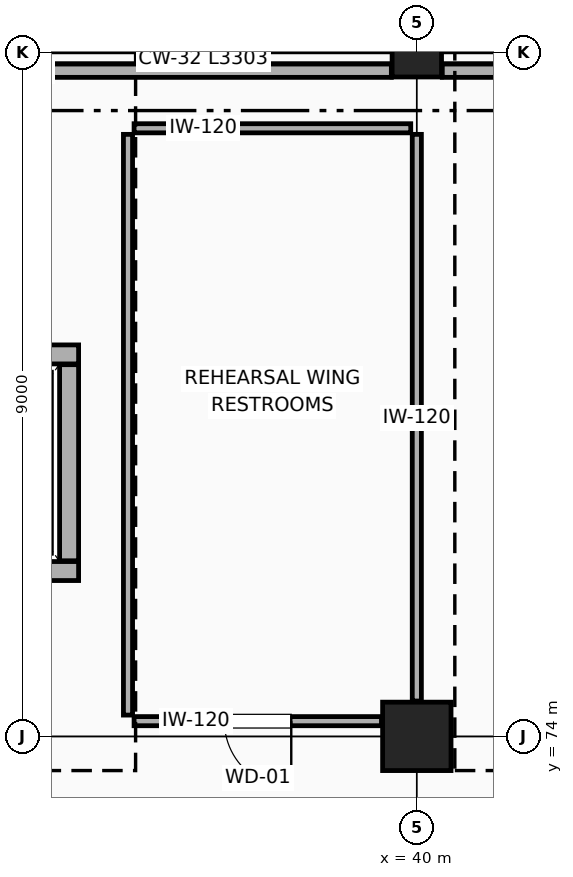
"""IFC4 building model, lengths in metres.
Left out: names, types, materials, properties, quantities, classifications, styles, units other than length and angle.
Written with IfcOpenShell. Run it as: python <this file> out.ifc"""

import sys

from ifc_helpers import new_model, si_unit, direction, frame, frame_2d, origin, origin_2d, place, context, subcontext, project, spatial, rectangle, extrude, element, fill, save


model = new_model("IFC4")
c1 = context("Model", 3, precision=1e-05, world=origin(), true_north=direction((0.0, 1.0)))
c2 = subcontext(c1, "Body", "Model", "MODEL_VIEW")
j1 = project(units=[si_unit("LENGTHUNIT", "METRE"), si_unit("PLANEANGLEUNIT", "RADIAN")], contexts=[c1])
p1 = place(None, origin())
s1 = spatial("IfcSite", under=j1, at=p1, CompositionType="ELEMENT")
p2 = place(p1, origin())
s2 = spatial("IfcBuilding", under=s1, at=p2, CompositionType="ELEMENT")
p3 = place(p2, frame((0.0, 0.0, 19.8)))
s3 = spatial("IfcBuildingStorey", under=s2, at=p3, CompositionType="ELEMENT", Elevation=19.8)
p4 = place(p3, frame((40.0, 74.0, 0.0), z_axis=(0.0, 0.0, 1.0), x_axis=(1.0, 0.0, 0.0)))
e1 = element("IfcColumn", 1, at=p4, inside=s3, PredefinedType="COLUMN", context=c2, shape_type="SweptSolid", body=[
    extrude(rectangle(XDim=0.9, YDim=0.9, at=origin_2d()), origin(), (0.0, 0.0, 1.0), 4.46),
])
p5 = place(p3, frame((40.0, 83.0, 0.0), z_axis=(0.0, 0.0, 1.0), x_axis=(1.0, 0.0, 0.0)))
e2 = element("IfcColumn", 2, at=p5, inside=s3, PredefinedType="COLUMN", context=c2, shape_type="SweptSolid", body=[
    extrude(rectangle(XDim=0.65, YDim=0.65, at=origin_2d()), origin(), (0.0, 0.0, 1.0), 4.5),
])
p6 = place(p3, frame((33.17, 82.76, 0.0), z_axis=(0.0, 0.0, 1.0), x_axis=(1.0, 0.0, 0.0)))
e3 = element("IfcWall", 3, at=p6, inside=s3, PredefinedType="PARAPET", context=c2, shape_type="SweptSolid", body=[
    extrude(rectangle(XDim=6.495, YDim=0.18, at=frame_2d((3.248, 0.0))), origin(), (0.0, 0.0, 1.0), 0.88),
])
p7 = place(p3, frame((40.335, 82.76, 0.0), z_axis=(0.0, 0.0, 1.0), x_axis=(1.0, 0.0, 0.0)))
e4 = element("IfcWall", 4, at=p7, inside=s3, PredefinedType="PARAPET", context=c2, shape_type="SweptSolid", body=[
    extrude(rectangle(XDim=7.33, YDim=0.18, at=frame_2d((3.665, 0.0))), origin(), (0.0, 0.0, 1.0), 0.88),
])
p8 = place(p3, frame((33.25, 76.175, 0.0), z_axis=(0.0, 0.0, 1.0), x_axis=(1.0, 0.0, 0.0)))
e5 = element("IfcWall", 5, at=p8, inside=s3, PredefinedType="STANDARD", context=c2, shape_type="SweptSolid", body=[
    extrude(rectangle(XDim=2.3, YDim=0.25, at=frame_2d((1.15, 0.0))), origin(), (0.0, 0.0, 1.0), 4.24),
])
p9 = place(p8, frame((0.6, 0.0, 0.0)))
e6 = element("IfcOpeningElement", 6, at=p9, cuts=e5, PredefinedType="OPENING", context=c2, shape_type="SweptSolid", body=[
    extrude(rectangle(XDim=1.1, YDim=2.15, at=frame_2d((0.55, 1.075))), frame((0.0, 0.135, 0.0), z_axis=(0.0, -1.0, 0.0), x_axis=(1.0, 0.0, 0.0)), (0.0, 0.0, 1.0), 0.27),
])
p10 = place(p3, frame((35.55, 79.025, 0.0), z_axis=(0.0, 0.0, 1.0), x_axis=(-1.0, 0.0, 0.0)))
e7 = element("IfcWall", 7, at=p10, inside=s3, PredefinedType="STANDARD", context=c2, shape_type="SweptSolid", body=[
    extrude(rectangle(XDim=2.3, YDim=0.25, at=frame_2d((1.15, 0.0))), origin(), (0.0, 0.0, 1.0), 4.24),
])
p11 = place(p3, frame((35.425, 76.31, 0.0), z_axis=(0.0, 0.0, 1.0), x_axis=(0.0, 1.0, 0.0)))
e8 = element("IfcWall", 8, at=p11, inside=s3, PredefinedType="STANDARD", context=c2, shape_type="SweptSolid", body=[
    extrude(rectangle(XDim=2.58, YDim=0.25, at=frame_2d((1.29, 0.0))), origin(), (0.0, 0.0, 1.0), 4.24),
])
p12 = place(p3, frame((40.0, 81.92, 0.0), z_axis=(0.0, 0.0, 1.0), x_axis=(0.0, -1.0, 0.0)))
e9 = element("IfcWall", 9, at=p12, inside=s3, PredefinedType="PARTITIONING", context=c2, shape_type="SweptSolid", body=[
    extrude(rectangle(XDim=7.455, YDim=0.12, at=frame_2d((3.728, 0.0))), origin(), (0.0, 0.0, 1.0), 3.88),
])
p13 = place(p3, frame((39.535, 74.2, 0.0), z_axis=(0.0, 0.0, 1.0), x_axis=(-1.0, 0.0, 0.0)))
e10 = element("IfcWall", 10, at=p13, inside=s3, PredefinedType="PARTITIONING", context=c2, shape_type="SweptSolid", body=[
    extrude(rectangle(XDim=3.255, YDim=0.12, at=frame_2d((1.627, 0.0))), origin(), (0.0, 0.0, 1.0), 4.24),
])
p14 = place(p13, frame((1.187, 0.0, 0.0)))
e11 = element("IfcOpeningElement", 11, at=p14, cuts=e10, PredefinedType="OPENING", context=c2, shape_type="SweptSolid", body=[
    extrude(rectangle(XDim=0.88, YDim=2.1, at=frame_2d((0.44, 1.05))), frame((0.0, 0.07, 0.0), z_axis=(0.0, -1.0, 0.0), x_axis=(1.0, 0.0, 0.0)), (0.0, 0.0, 1.0), 0.14),
])
p15 = place(p3, frame((36.2, 74.28, 0.0), z_axis=(0.0, 0.0, 1.0), x_axis=(0.0, 1.0, 0.0)))
e12 = element("IfcWall", 12, at=p15, inside=s3, PredefinedType="PARTITIONING", context=c2, shape_type="SweptSolid", body=[
    extrude(rectangle(XDim=7.64, YDim=0.12, at=frame_2d((3.82, 0.0))), origin(), (0.0, 0.0, 1.0), 4.24),
])
p16 = place(p3, frame((36.28, 82.0, 0.0), z_axis=(0.0, 0.0, 1.0), x_axis=(1.0, 0.0, 0.0)))
e13 = element("IfcWall", 13, at=p16, inside=s3, PredefinedType="PARTITIONING", context=c2, shape_type="SweptSolid", body=[
    extrude(rectangle(XDim=3.64, YDim=0.12, at=frame_2d((1.82, 0.0))), origin(), (0.0, 0.0, 1.0), 4.24),
])
p17 = place(p14, origin())
e14 = element("IfcDoor", 14, at=p17, inside=s3, OperationType="SINGLE_SWING_LEFT", PredefinedType="DOOR", context=c2, shape_type="SweptSolid", body=[
    extrude(rectangle(XDim=0.88, YDim=2.1, at=frame_2d((0.44, 1.05))), frame((0.0, 0.025, 0.0), z_axis=(0.0, -1.0, 0.0), x_axis=(1.0, 0.0, 0.0)), (0.0, 0.0, 1.0), 0.05),
])
fill(e11, e14)
save(model, sys.argv[1])
